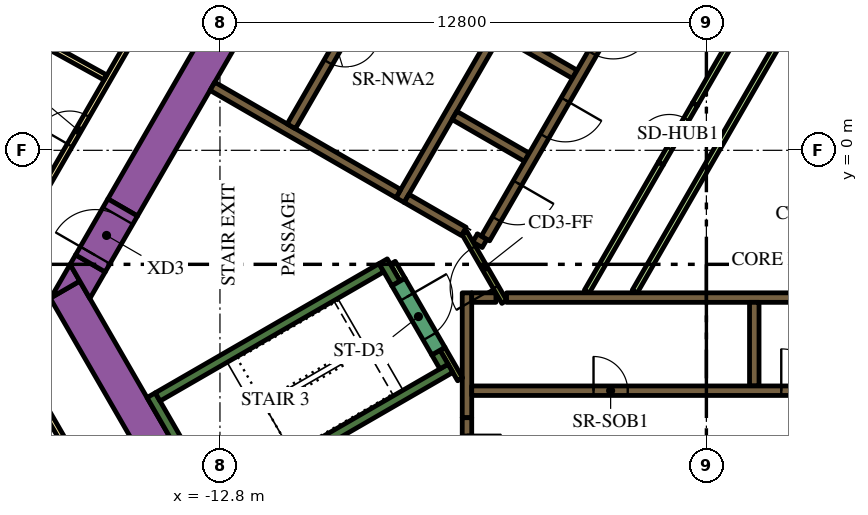
"""IFC4 building model, lengths in metres.
Left out: names, types, materials, properties, quantities, classifications, styles, units other than length and angle.
Written with IfcOpenShell. Run it as: python <this file> out.ifc"""

import sys

from ifc_helpers import new_model, si_unit, direction, frame, frame_2d, origin, place, context, subcontext, project, spatial, polyline, rectangle, outline, extrude, element, fill, save


model = new_model("IFC4")
c1 = context("Model", 3, precision=1e-05, world=origin(), true_north=direction((0.0, 1.0)))
c2 = subcontext(c1, "Body", "Model", "MODEL_VIEW")
j1 = project(units=[si_unit("LENGTHUNIT", "METRE"), si_unit("PLANEANGLEUNIT", "RADIAN")], contexts=[c1])
p1 = place(None, origin())
s1 = spatial("IfcSite", under=j1, at=p1, CompositionType="ELEMENT")
p2 = place(p1, origin())
s2 = spatial("IfcBuilding", under=s1, at=p2, CompositionType="ELEMENT")
p3 = place(p2, frame((0.0, 0.0, 66.6)))
s3 = spatial("IfcBuildingStorey", under=s2, at=p3, CompositionType="ELEMENT", Elevation=66.6)
p4 = place(p3, frame((-15.36, -1.503, 0.0), z_axis=(0.0, 0.0, 1.0), x_axis=(0.50000389221, 0.866023156604, 0.0)))
e1 = element("IfcWall", 1, at=p4, inside=s3, PredefinedType="SOLIDWALL", context=c2, shape_type="SweptSolid", body=[
    extrude(rectangle(XDim=21.0, YDim=0.9, at=frame_2d((10.5, 0.0))), origin(), (0.0, 0.0, 1.0), 3.9),
])
p5 = place(p3, frame((-12.134, -11.883, 0.0), z_axis=(0.0, 0.0, 1.0), x_axis=(-0.500005339912, 0.866022320763, 0.0)))
e2 = element("IfcWall", 2, at=p5, inside=s3, PredefinedType="SOLIDWALL", context=c2, shape_type="SweptSolid", body=[
    extrude(rectangle(XDim=9.488, YDim=0.9, at=frame_2d((4.744, 0.0))), origin(), (0.0, 0.0, 1.0), 3.9),
])
p6 = place(p3, origin())
e3 = element("IfcWall", 3, at=p6, inside=s3, PredefinedType="SOLIDWALL", context=c2, shape_type="SweptSolid", body=[
    extrude(outline(polyline([(-16.489, -3.44), (-17.251, -3.88), (-16.743, -3.0), (-16.489, -3.44)])), origin(), (0.0, 0.0, 1.0), 3.9),
])
e4 = element("IfcWall", 4, at=p6, inside=s3, PredefinedType="SOLIDWALL", context=c2, shape_type="SweptSolid", body=[
    extrude(outline(polyline([(-15.82, -3.201), (-16.223, -3.9), (-16.743, -3.0), (-16.599, -2.751), (-15.82, -3.201)])), origin(), (0.0, 0.0, 1.0), 3.9),
])
p7 = place(p3, frame((-12.885, -9.431, 0.0), z_axis=(0.0, 0.0, 1.0), x_axis=(-0.500020560727, 0.866013532718, 0.0)))
e5 = element("IfcWall", 5, at=p7, inside=s3, PredefinedType="SOLIDWALL", context=c2, shape_type="SweptSolid", body=[
    extrude(rectangle(XDim=3.45, YDim=0.25, at=frame_2d((1.725, 0.0))), origin(), (0.0, 0.0, 1.0), 3.9),
])
p8 = place(p3, frame((-14.44, -6.49, 0.0), z_axis=(0.0, 0.0, 1.0), x_axis=(0.866022966069, 0.500004222222, 0.0)))
e6 = element("IfcWall", 6, at=p8, inside=s3, PredefinedType="SOLIDWALL", context=c2, shape_type="SweptSolid", body=[
    extrude(rectangle(XDim=6.8, YDim=0.25, at=frame_2d((3.4, 0.0))), origin(), (0.0, 0.0, 1.0), 3.9),
])
p9 = place(p3, frame((-8.168, -3.503, 0.0), z_axis=(0.0, 0.0, 1.0), x_axis=(-0.499952099219, 0.866053057547, 0.0)))
e7 = element("IfcWall", 7, at=p9, inside=s3, PredefinedType="SOLIDWALL", context=c2, shape_type="SweptSolid", body=[
    extrude(rectangle(XDim=0.675, YDim=0.25, at=frame_2d((0.337, 0.0))), origin(), (0.0, 0.0, 1.0), 3.9),
])
p10 = place(p3, frame((-12.84, -9.261, 0.0), z_axis=(0.0, 0.0, 1.0), x_axis=(0.866016039709, 0.500016218704, 0.0)))
e8 = element("IfcWall", 8, at=p10, inside=s3, PredefinedType="SOLIDWALL", context=c2, shape_type="SweptSolid", body=[
    extrude(rectangle(XDim=7.05, YDim=0.25, at=frame_2d((3.525, 0.0))), origin(), (0.0, 0.0, 1.0), 3.9),
])
p11 = place(p3, frame((-6.905, -5.69, 0.0), z_axis=(0.0, 0.0, 1.0), x_axis=(-0.500402024738, 0.865793170242, 0.0)))
e9 = element("IfcWall", 9, at=p11, inside=s3, PredefinedType="SOLIDWALL", context=c2, shape_type="SweptSolid", body=[
    extrude(rectangle(XDim=0.425, YDim=0.25, at=frame_2d((0.212, 0.0))), origin(), (0.0, 0.0, 1.0), 3.9),
])
p12 = place(p3, frame((-5.259, -3.875, 0.0), z_axis=(0.0, 0.0, 1.0), x_axis=(1.0, 0.0, 0.0)))
e10 = element("IfcWall", 10, at=p12, inside=s3, PredefinedType="SOLIDWALL", context=c2, shape_type="SweptSolid", body=[
    extrude(rectangle(XDim=10.489, YDim=0.25, at=frame_2d((5.244, 0.0))), origin(), (0.0, 0.0, 1.0), 3.9),
])
p13 = place(p3, frame((1.26, -4.0, 0.0), z_axis=(0.0, 0.0, 1.0), x_axis=(0.0, -1.0, 0.0)))
e11 = element("IfcWall", 11, at=p13, inside=s3, PredefinedType="SOLIDWALL", context=c2, shape_type="SweptSolid", body=[
    extrude(rectangle(XDim=2.2, YDim=0.25, at=frame_2d((1.1, 0.0))), origin(), (0.0, 0.0, 1.0), 3.9),
])
p14 = place(p3, frame((-6.3, -7.035, 0.0), z_axis=(0.0, 0.0, 1.0), x_axis=(0.0, 1.0, 0.0)))
e12 = element("IfcWall", 12, at=p14, inside=s3, PredefinedType="SOLIDWALL", context=c2, shape_type="SweptSolid", body=[
    extrude(rectangle(XDim=3.285, YDim=0.25, at=frame_2d((1.643, 0.0))), origin(), (0.0, 0.0, 1.0), 3.9),
])
p15 = place(p3, frame((-6.175, -3.875, 0.0), z_axis=(0.0, 0.0, 1.0), x_axis=(1.0, 0.0, 0.0)))
e13 = element("IfcWall", 13, at=p15, inside=s3, PredefinedType="SOLIDWALL", context=c2, shape_type="SweptSolid", body=[
    extrude(rectangle(XDim=0.637, YDim=0.25, at=frame_2d((0.318, 0.0))), origin(), (0.0, 0.0, 1.0), 3.9),
])
p16 = place(p3, frame((5.97, -2.591, 0.0), z_axis=(0.0, 0.0, 1.0), x_axis=(-0.499994469932, 0.866028596547, 0.0)))
e14 = element("IfcWall", 14, at=p16, inside=s3, PredefinedType="SOLIDWALL", context=c2, shape_type="SweptSolid", body=[
    extrude(rectangle(XDim=10.488, YDim=0.25, at=frame_2d((5.244, 0.0))), origin(), (0.0, 0.0, 1.0), 3.9),
])
p17 = place(p3, frame((-8.06, -1.311, 0.0), z_axis=(0.0, 0.0, 1.0), x_axis=(0.50000273126, 0.866023826885, 0.0)))
e15 = element("IfcWall", 15, at=p17, inside=s3, PredefinedType="SOLIDWALL", context=c2, shape_type="SweptSolid", body=[
    extrude(rectangle(XDim=10.33, YDim=0.25, at=frame_2d((5.165, 0.0))), origin(), (0.0, 0.0, 1.0), 3.9),
])
for number, where, z_axis, x_axis in (
    (16, (-5.369, 3.1, 0.0), (0.0, 0.0, 1.0), (0.866, -0.5, 0.0)),
    (17, (-4.724, -0.182, 0.0), (0.0, 0.0, 1.0), (-0.866, 0.5, 0.0)),
):
    element("IfcWall", number, at=place(p3, frame(where, z_axis=z_axis, x_axis=x_axis)), inside=s3, PredefinedType="SOLIDWALL", context=c2, shape_type="SweptSolid", body=[
        extrude(rectangle(XDim=2.2, YDim=0.25, at=frame_2d((1.1, 0.0))), origin(), (0.0, 0.0, 1.0), 3.9),
    ])
p18 = place(p3, frame((-6.088, -2.305, 0.0), z_axis=(0.0, 0.0, 1.0), x_axis=(0.866059450854, -0.499941024108, 0.0)))
e18 = element("IfcWall", 18, at=p18, inside=s3, PredefinedType="SOLIDWALL", context=c2, shape_type="SweptSolid", body=[
    extrude(rectangle(XDim=0.29, YDim=0.25, at=frame_2d((0.145, 0.0))), origin(), (0.0, 0.0, 1.0), 3.9),
])
p19 = place(p3, frame((-7.889, -1.265, 0.0), z_axis=(0.0, 0.0, 1.0), x_axis=(0.865986741702, -0.500066958712, 0.0)))
e19 = element("IfcWall", 19, at=p19, inside=s3, PredefinedType="SOLIDWALL", context=c2, shape_type="SweptSolid", body=[
    extrude(rectangle(XDim=1.738, YDim=0.25, at=frame_2d((0.869, 0.0))), origin(), (0.0, 0.0, 1.0), 3.9),
])
p20 = place(p3, frame((-8.106, -1.14, 0.0), z_axis=(0.0, 0.0, 1.0), x_axis=(-0.866000643155, 0.500042884217, 0.0)))
e20 = element("IfcWall", 20, at=p20, inside=s3, PredefinedType="SOLIDWALL", context=c2, shape_type="SweptSolid", body=[
    extrude(rectangle(XDim=5.65, YDim=0.25, at=frame_2d((2.825, 0.0))), origin(), (0.0, 0.0, 1.0), 3.9),
])
p21 = place(p3, frame((-6.48, -6.027, 0.0), z_axis=(0.0, 0.0, 1.0), x_axis=(-0.499927229454, 0.866067413802, 0.0)))
e21 = element("IfcWall", 21, at=p21, inside=s3, PredefinedType="PARTITIONING", context=c2, shape_type="SweptSolid", body=[
    extrude(rectangle(XDim=0.929, YDim=0.15, at=frame_2d((0.464, 0.0))), origin(), (0.0, 0.0, 1.0), 3.9),
])
p22 = place(p3, frame((-8.252, -2.958, 0.0), z_axis=(0.0, 0.0, 1.0), x_axis=(0.500174715838, -0.865924508047, 0.0)))
e22 = element("IfcWall", 22, at=p22, inside=s3, PredefinedType="PARTITIONING", context=c2, shape_type="SweptSolid", body=[
    extrude(rectangle(XDim=0.514, YDim=0.15, at=frame_2d((0.257, 0.0))), origin(), (0.0, 0.0, 1.0), 2.75),
])
p23 = place(p3, frame((-3.147, -3.718, 0.0), z_axis=(0.0, 0.0, 1.0), x_axis=(0.500010131483, 0.866019554291, 0.0)))
e23 = element("IfcWall", 23, at=p23, inside=s3, PredefinedType="PARTITIONING", context=c2, shape_type="SweptSolid", body=[
    extrude(rectangle(XDim=3.894, YDim=0.15, at=frame_2d((1.947, 0.0))), origin(), (0.0, 0.0, 1.0), 2.75),
])
p24 = place(p3, frame((-1.887, -3.718, 0.0), z_axis=(0.0, 0.0, 1.0), x_axis=(0.500005008002, 0.866022512394, 0.0)))
e24 = element("IfcWall", 24, at=p24, inside=s3, PredefinedType="PARTITIONING", context=c2, shape_type="SweptSolid", body=[
    extrude(rectangle(XDim=8.327, YDim=0.15, at=frame_2d((4.164, 0.0))), origin(), (0.0, 0.0, 1.0), 2.75),
])
p25 = place(p3, frame((-0.3, 1.212, 0.0), z_axis=(0.0, 0.0, 1.0), x_axis=(0.499963101113, 0.866046706318, 0.0)))
e25 = element("IfcWall", 25, at=p25, inside=s3, PredefinedType="PARTITIONING", context=c2, shape_type="SweptSolid", body=[
    extrude(rectangle(XDim=3.893, YDim=0.15, at=frame_2d((1.947, 0.0))), origin(), (0.0, 0.0, 1.0), 2.75),
])
p26 = place(p3, frame((-6.175, -6.325, 0.0), z_axis=(0.0, 0.0, 1.0), x_axis=(1.0, 0.0, 0.0)))
e26 = element("IfcWall", 26, at=p26, inside=s3, PredefinedType="SOLIDWALL", context=c2, shape_type="SweptSolid", body=[
    extrude(rectangle(XDim=12.35, YDim=0.25, at=frame_2d((6.175, 0.0))), origin(), (0.0, 0.0, 1.0), 3.9),
])
p27 = place(p26, frame((3.205, 0.0, 0.0)))
e27 = element("IfcOpeningElement", 27, at=p27, cuts=e26, PredefinedType="OPENING", context=c2, shape_type="SweptSolid", body=[
    extrude(rectangle(XDim=0.9, YDim=2.1, at=frame_2d((0.45, 1.05))), frame((0.0, 0.135, 0.0), z_axis=(0.0, -1.0, 0.0), x_axis=(1.0, 0.0, 0.0)), (0.0, 0.0, 1.0), 0.27),
])
p28 = place(p26, frame((8.145, 0.0, 0.0)))
e28 = element("IfcOpeningElement", 28, at=p28, cuts=e26, PredefinedType="OPENING", context=c2, shape_type="SweptSolid", body=[
    extrude(rectangle(XDim=1.1, YDim=2.1, at=frame_2d((0.55, 1.05))), frame((0.0, 0.135, 0.0), z_axis=(0.0, -1.0, 0.0), x_axis=(1.0, 0.0, 0.0)), (0.0, 0.0, 1.0), 0.27),
])
p29 = place(p26, frame((10.665, 0.0, 0.0)))
e29 = element("IfcOpeningElement", 29, at=p29, cuts=e26, PredefinedType="OPENING", context=c2, shape_type="SweptSolid", body=[
    extrude(rectangle(XDim=1.1, YDim=2.1, at=frame_2d((0.55, 1.05))), frame((0.0, 0.135, 0.0), z_axis=(0.0, -1.0, 0.0), x_axis=(1.0, 0.0, 0.0)), (0.0, 0.0, 1.0), 0.27),
])
p30 = place(p3, frame((-6.008, 9.144, 0.0), z_axis=(0.0, 0.0, 1.0), x_axis=(-0.500006956611, -0.866021387346, 0.0)))
e30 = element("IfcWall", 30, at=p30, inside=s3, PredefinedType="SOLIDWALL", context=c2, shape_type="SweptSolid", body=[
    extrude(rectangle(XDim=9.83, YDim=0.25, at=frame_2d((4.915, 0.0))), origin(), (0.0, 0.0, 1.0), 3.9),
])
p31 = place(p30, frame((6.985, 0.0, 0.0)))
e31 = element("IfcOpeningElement", 31, at=p31, cuts=e30, PredefinedType="OPENING", context=c2, shape_type="SweptSolid", body=[
    extrude(rectangle(XDim=0.9, YDim=2.1, at=frame_2d((0.45, 1.05))), frame((0.0, 0.135, 0.0), z_axis=(0.0, -1.0, 0.0), x_axis=(1.0, 0.0, 0.0)), (0.0, 0.0, 1.0), 0.27),
])
p32 = place(p3, frame((-0.898, 6.194, 0.0), z_axis=(0.0, 0.0, 1.0), x_axis=(-0.499996202215, -0.866027596426, 0.0)))
e32 = element("IfcWall", 32, at=p32, inside=s3, PredefinedType="SOLIDWALL", context=c2, shape_type="SweptSolid", body=[
    extrude(rectangle(XDim=9.83, YDim=0.25, at=frame_2d((4.915, 0.0))), origin(), (0.0, 0.0, 1.0), 3.9),
])
p33 = place(p32, frame((0.585, 0.0, 0.0)))
e33 = element("IfcOpeningElement", 33, at=p33, cuts=e32, PredefinedType="OPENING", context=c2, shape_type="SweptSolid", body=[
    extrude(rectangle(XDim=1.1, YDim=2.1, at=frame_2d((0.55, 1.05))), frame((0.0, 0.135, 0.0), z_axis=(0.0, -1.0, 0.0), x_axis=(1.0, 0.0, 0.0)), (0.0, 0.0, 1.0), 0.27),
])
p34 = place(p32, frame((3.105, 0.0, 0.0)))
e34 = element("IfcOpeningElement", 34, at=p34, cuts=e32, PredefinedType="OPENING", context=c2, shape_type="SweptSolid", body=[
    extrude(rectangle(XDim=1.1, YDim=2.1, at=frame_2d((0.55, 1.05))), frame((0.0, 0.135, 0.0), z_axis=(0.0, -1.0, 0.0), x_axis=(1.0, 0.0, 0.0)), (0.0, 0.0, 1.0), 0.27),
])
p35 = place(p32, frame((5.625, 0.0, 0.0)))
e35 = element("IfcOpeningElement", 35, at=p35, cuts=e32, PredefinedType="OPENING", context=c2, shape_type="SweptSolid", body=[
    extrude(rectangle(XDim=1.1, YDim=2.1, at=frame_2d((0.55, 1.05))), frame((0.0, 0.135, 0.0), z_axis=(0.0, -1.0, 0.0), x_axis=(1.0, 0.0, 0.0)), (0.0, 0.0, 1.0), 0.27),
])
p36 = place(p32, frame((8.145, 0.0, 0.0)))
e36 = element("IfcOpeningElement", 36, at=p36, cuts=e32, PredefinedType="OPENING", context=c2, shape_type="SweptSolid", body=[
    extrude(rectangle(XDim=1.1, YDim=2.1, at=frame_2d((0.55, 1.05))), frame((0.0, 0.135, 0.0), z_axis=(0.0, -1.0, 0.0), x_axis=(1.0, 0.0, 0.0)), (0.0, 0.0, 1.0), 0.27),
])
p37 = place(p3, frame((-8.103, -3.466, 0.0), z_axis=(0.0, 0.0, 1.0), x_axis=(0.500078061341, -0.865980330357, 0.0)))
e37 = element("IfcWall", 37, at=p37, inside=s3, PredefinedType="SOLIDWALL", context=c2, shape_type="SweptSolid", body=[
    extrude(rectangle(XDim=2.1, YDim=0.4, at=frame_2d((1.05, 0.0))), origin(), (0.0, 0.0, 1.0), 3.9),
])
p38 = place(p37, frame((0.45, 0.0, 0.0)))
e38 = element("IfcOpeningElement", 38, at=p38, cuts=e37, PredefinedType="OPENING", context=c2, shape_type="SweptSolid", body=[
    extrude(rectangle(XDim=1.2, YDim=2.1, at=frame_2d((0.6, 1.05))), frame((0.0, 0.21, 0.0), z_axis=(0.0, -1.0, 0.0), x_axis=(1.0, 0.0, 0.0)), (0.0, 0.0, 1.0), 0.42),
])
p39 = place(p3, frame((-6.3, -7.035, 0.0), z_axis=(0.0, 0.0, 1.0), x_axis=(0.0, -1.0, 0.0)))
e39 = element("IfcWall", 39, at=p39, inside=s3, PredefinedType="SOLIDWALL", context=c2, shape_type="SweptSolid", body=[
    extrude(rectangle(XDim=1.8, YDim=0.25, at=frame_2d((0.9, 0.0))), origin(), (0.0, 0.0, 1.0), 3.9),
])
p40 = place(p39, frame((0.45, 0.0, 0.0)))
e40 = element("IfcOpeningElement", 40, at=p40, cuts=e39, PredefinedType="OPENING", context=c2, shape_type="SweptSolid", body=[
    extrude(rectangle(XDim=0.9, YDim=2.1, at=frame_2d((0.45, 1.05))), frame((0.0, 0.135, 0.0), z_axis=(0.0, -1.0, 0.0), x_axis=(1.0, 0.0, 0.0)), (0.0, 0.0, 1.0), 0.27),
])
p41 = place(p3, frame((-5.317, -3.99, 0.0), z_axis=(0.0, 0.0, 1.0), x_axis=(-0.500027713859, 0.866009402589, 0.0)))
e41 = element("IfcWall", 41, at=p41, inside=s3, PredefinedType="PARTITIONING", context=c2, shape_type="SweptSolid", body=[
    extrude(rectangle(XDim=2.1, YDim=0.15, at=frame_2d((1.05, 0.0))), origin(), (0.0, 0.0, 1.0), 3.9),
])
p42 = place(p41, frame((0.45, 0.0, 0.0)))
e42 = element("IfcOpeningElement", 42, at=p42, cuts=e41, PredefinedType="OPENING", context=c2, shape_type="SweptSolid", body=[
    extrude(rectangle(XDim=1.2, YDim=2.1, at=frame_2d((0.6, 1.05))), frame((0.0, 0.085, 0.0), z_axis=(0.0, -1.0, 0.0), x_axis=(1.0, 0.0, 0.0)), (0.0, 0.0, 1.0), 0.17),
])
p43 = place(p3, frame((-16.209, -2.976, 0.0), z_axis=(0.0, 0.0, 1.0), x_axis=(0.499954529098, 0.86605165483, 0.0)))
e43 = element("IfcWall", 43, at=p43, inside=s3, PredefinedType="SOLIDWALL", context=c2, shape_type="SweptSolid", body=[
    extrude(rectangle(XDim=1.7, YDim=0.9, at=frame_2d((0.85, 0.0))), origin(), (0.0, 0.0, 1.0), 3.9),
])
p44 = place(p43, frame((0.25, 0.0, 0.0)))
e44 = element("IfcOpeningElement", 44, at=p44, cuts=e43, PredefinedType="OPENING", context=c2, shape_type="SweptSolid", body=[
    extrude(rectangle(XDim=1.2, YDim=2.1, at=frame_2d((0.6, 1.05))), frame((0.0, 0.46, 0.0), z_axis=(0.0, -1.0, 0.0), x_axis=(1.0, 0.0, 0.0)), (0.0, 0.0, 1.0), 0.92),
])
p45 = place(p3, frame((-1.2, -0.346, 0.0), z_axis=(0.0, 0.0, 1.0), x_axis=(0.499961193289, 0.866047807691, 0.0)))
e45 = element("IfcWall", 45, at=p45, inside=s3, PredefinedType="PARTITIONING", context=c2, shape_type="SweptSolid", body=[
    extrude(rectangle(XDim=1.8, YDim=0.15, at=frame_2d((0.9, 0.0))), origin(), (0.0, 0.0, 1.0), 2.75),
])
p46 = place(p45, frame((0.45, 0.0, 0.0)))
e46 = element("IfcOpeningElement", 46, at=p46, cuts=e45, PredefinedType="OPENING", context=c2, shape_type="SweptSolid", body=[
    extrude(rectangle(XDim=0.9, YDim=2.1, at=frame_2d((0.45, 1.05))), frame((0.0, 0.085, 0.0), z_axis=(0.0, -1.0, 0.0), x_axis=(1.0, 0.0, 0.0)), (0.0, 0.0, 1.0), 0.17),
])
p47 = place(p3, frame((-19.081, -3.9, 0.0), z_axis=(0.0, 0.0, 1.0), x_axis=(0.499998313975, 0.866026377209, 0.0)))
e47 = element("IfcWall", 47, at=p47, inside=s3, PredefinedType="PARTITIONING", context=c2, shape_type="SweptSolid", body=[
    extrude(rectangle(XDim=25.766, YDim=0.15, at=frame_2d((12.883, 0.0))), origin(), (0.0, 0.0, 1.0), 2.75),
])
p48 = place(p47, frame((24.586, 0.0, 0.0)))
e48 = element("IfcOpeningElement", 48, at=p48, cuts=e47, PredefinedType="OPENING", context=c2, shape_type="SweptSolid", body=[
    extrude(rectangle(XDim=1.0, YDim=2.1, at=frame_2d((0.5, 1.05))), frame((0.0, 0.085, 0.0), z_axis=(0.0, -1.0, 0.0), x_axis=(1.0, 0.0, 0.0)), (0.0, 0.0, 1.0), 0.17),
])
p49 = place(p47, frame((9.948, 0.0, 0.0)))
e49 = element("IfcOpeningElement", 49, at=p49, cuts=e47, PredefinedType="OPENING", context=c2, shape_type="SweptSolid", body=[
    extrude(rectangle(XDim=1.0, YDim=2.1, at=frame_2d((0.5, 1.05))), frame((0.0, 0.085, 0.0), z_axis=(0.0, -1.0, 0.0), x_axis=(1.0, 0.0, 0.0)), (0.0, 0.0, 1.0), 0.17),
])
p50 = place(p47, frame((7.782, 0.0, 0.0)))
e50 = element("IfcOpeningElement", 50, at=p50, cuts=e47, PredefinedType="OPENING", context=c2, shape_type="SweptSolid", body=[
    extrude(rectangle(XDim=0.9, YDim=2.1, at=frame_2d((0.45, 1.05))), frame((0.0, 0.085, 0.0), z_axis=(0.0, -1.0, 0.0), x_axis=(1.0, 0.0, 0.0)), (0.0, 0.0, 1.0), 0.17),
])
p51 = place(p47, frame((4.658, 0.0, 0.0)))
e51 = element("IfcOpeningElement", 51, at=p51, cuts=e47, PredefinedType="OPENING", context=c2, shape_type="SweptSolid", body=[
    extrude(rectangle(XDim=0.9, YDim=2.1, at=frame_2d((0.45, 1.05))), frame((0.0, 0.085, 0.0), z_axis=(0.0, -1.0, 0.0), x_axis=(1.0, 0.0, 0.0)), (0.0, 0.0, 1.0), 0.17),
])
p52 = place(p3, frame((-16.412, -8.523, 0.0), z_axis=(0.0, 0.0, 1.0), x_axis=(-0.500001929737, 0.866024289647, 0.0)))
e52 = element("IfcWall", 52, at=p52, inside=s3, PredefinedType="PARTITIONING", context=c2, shape_type="SweptSolid", body=[
    extrude(rectangle(XDim=5.268, YDim=0.15, at=frame_2d((2.634, 0.0))), origin(), (0.0, 0.0, 1.0), 2.75),
])
p53 = place(p52, frame((4.088, 0.0, 0.0)))
e53 = element("IfcOpeningElement", 53, at=p53, cuts=e52, PredefinedType="OPENING", context=c2, shape_type="SweptSolid", body=[
    extrude(rectangle(XDim=1.0, YDim=2.1, at=frame_2d((0.5, 1.05))), frame((0.0, 0.085, 0.0), z_axis=(0.0, -1.0, 0.0), x_axis=(1.0, 0.0, 0.0)), (0.0, 0.0, 1.0), 0.17),
])
p54 = place(p3, frame((-23.132, 5.962, 0.0), z_axis=(0.0, 0.0, 1.0), x_axis=(0.875121716713, -0.483902863121, 0.0)))
e54 = element("IfcWall", 54, at=p54, inside=s3, PredefinedType="PARTITIONING", context=c2, shape_type="SweptSolid", body=[
    extrude(rectangle(XDim=8.355, YDim=0.15, at=frame_2d((4.178, 0.0))), origin(), (0.0, 0.0, 1.0), 2.75),
])
p55 = place(p27, origin())
e55 = element("IfcDoor", 55, at=p55, inside=s3, OperationType="SINGLE_SWING_LEFT", PredefinedType="DOOR", context=c2, shape_type="SweptSolid", body=[
    extrude(rectangle(XDim=0.9, YDim=2.1, at=frame_2d((0.45, 1.05))), frame((0.0, 0.025, 0.0), z_axis=(0.0, -1.0, 0.0), x_axis=(1.0, 0.0, 0.0)), (0.0, 0.0, 1.0), 0.05),
])
fill(e27, e55)
p56 = place(p28, origin())
e56 = element("IfcDoor", 56, at=p56, inside=s3, OperationType="DOUBLE_DOOR_SLIDING", PredefinedType="DOOR", context=c2, shape_type="SweptSolid", body=[
    extrude(rectangle(XDim=1.1, YDim=2.1, at=frame_2d((0.55, 1.05))), frame((0.0, 0.025, 0.0), z_axis=(0.0, -1.0, 0.0), x_axis=(1.0, 0.0, 0.0)), (0.0, 0.0, 1.0), 0.05),
])
fill(e28, e56)
p57 = place(p31, origin())
e57 = element("IfcDoor", 57, at=p57, inside=s3, OperationType="SINGLE_SWING_LEFT", PredefinedType="DOOR", context=c2, shape_type="SweptSolid", body=[
    extrude(rectangle(XDim=0.9, YDim=2.1, at=frame_2d((0.45, 1.05))), frame((0.0, 0.025, 0.0), z_axis=(0.0, -1.0, 0.0), x_axis=(1.0, 0.0, 0.0)), (0.0, 0.0, 1.0), 0.05),
])
fill(e31, e57)
p58 = place(p34, origin())
e58 = element("IfcDoor", 58, at=p58, inside=s3, OperationType="DOUBLE_DOOR_SLIDING", PredefinedType="DOOR", context=c2, shape_type="SweptSolid", body=[
    extrude(rectangle(XDim=1.1, YDim=2.1, at=frame_2d((0.55, 1.05))), frame((0.0, 0.025, 0.0), z_axis=(0.0, -1.0, 0.0), x_axis=(1.0, 0.0, 0.0)), (0.0, 0.0, 1.0), 0.05),
])
fill(e34, e58)
p59 = place(p35, origin())
e59 = element("IfcDoor", 59, at=p59, inside=s3, OperationType="DOUBLE_DOOR_SLIDING", PredefinedType="DOOR", context=c2, shape_type="SweptSolid", body=[
    extrude(rectangle(XDim=1.1, YDim=2.1, at=frame_2d((0.55, 1.05))), frame((0.0, 0.025, 0.0), z_axis=(0.0, -1.0, 0.0), x_axis=(1.0, 0.0, 0.0)), (0.0, 0.0, 1.0), 0.05),
])
fill(e35, e59)
p60 = place(p36, origin())
e60 = element("IfcDoor", 60, at=p60, inside=s3, OperationType="DOUBLE_DOOR_SLIDING", PredefinedType="DOOR", context=c2, shape_type="SweptSolid", body=[
    extrude(rectangle(XDim=1.1, YDim=2.1, at=frame_2d((0.55, 1.05))), frame((0.0, 0.025, 0.0), z_axis=(0.0, -1.0, 0.0), x_axis=(1.0, 0.0, 0.0)), (0.0, 0.0, 1.0), 0.05),
])
fill(e36, e60)
p61 = place(p38, origin())
e61 = element("IfcDoor", 61, at=p61, inside=s3, OperationType="SINGLE_SWING_LEFT", PredefinedType="DOOR", context=c2, shape_type="SweptSolid", body=[
    extrude(rectangle(XDim=1.2, YDim=2.1, at=frame_2d((0.6, 1.05))), frame((0.0, 0.025, 0.0), z_axis=(0.0, -1.0, 0.0), x_axis=(1.0, 0.0, 0.0)), (0.0, 0.0, 1.0), 0.05),
])
fill(e38, e61)
p62 = place(p40, origin())
e62 = element("IfcDoor", 62, at=p62, inside=s3, OperationType="SINGLE_SWING_LEFT", PredefinedType="DOOR", context=c2, shape_type="SweptSolid", body=[
    extrude(rectangle(XDim=0.9, YDim=2.1, at=frame_2d((0.45, 1.05))), frame((0.0, 0.025, 0.0), z_axis=(0.0, -1.0, 0.0), x_axis=(1.0, 0.0, 0.0)), (0.0, 0.0, 1.0), 0.05),
])
fill(e40, e62)
p63 = place(p42, origin())
e63 = element("IfcDoor", 63, at=p63, inside=s3, OperationType="SINGLE_SWING_LEFT", PredefinedType="DOOR", context=c2, shape_type="SweptSolid", body=[
    extrude(rectangle(XDim=1.2, YDim=2.1, at=frame_2d((0.6, 1.05))), frame((0.0, 0.025, 0.0), z_axis=(0.0, -1.0, 0.0), x_axis=(1.0, 0.0, 0.0)), (0.0, 0.0, 1.0), 0.05),
])
fill(e42, e63)
p64 = place(p44, origin())
e64 = element("IfcDoor", 64, at=p64, inside=s3, OperationType="SINGLE_SWING_LEFT", PredefinedType="DOOR", context=c2, shape_type="SweptSolid", body=[
    extrude(rectangle(XDim=1.2, YDim=2.1, at=frame_2d((0.6, 1.05))), frame((0.0, 0.025, 0.0), z_axis=(0.0, -1.0, 0.0), x_axis=(1.0, 0.0, 0.0)), (0.0, 0.0, 1.0), 0.05),
])
fill(e44, e64)
p65 = place(p46, origin())
e65 = element("IfcDoor", 65, at=p65, inside=s3, OperationType="SINGLE_SWING_LEFT", PredefinedType="DOOR", context=c2, shape_type="SweptSolid", body=[
    extrude(rectangle(XDim=0.9, YDim=2.1, at=frame_2d((0.45, 1.05))), frame((0.0, 0.025, 0.0), z_axis=(0.0, -1.0, 0.0), x_axis=(1.0, 0.0, 0.0)), (0.0, 0.0, 1.0), 0.05),
])
fill(e46, e65)
p66 = place(p51, origin())
e66 = element("IfcDoor", 66, at=p66, inside=s3, OperationType="SINGLE_SWING_LEFT", PredefinedType="DOOR", context=c2, shape_type="SweptSolid", body=[
    extrude(rectangle(XDim=0.9, YDim=2.1, at=frame_2d((0.45, 1.05))), frame((0.0, 0.025, 0.0), z_axis=(0.0, -1.0, 0.0), x_axis=(1.0, 0.0, 0.0)), (0.0, 0.0, 1.0), 0.05),
])
fill(e51, e66)
save(model, sys.argv[1])
